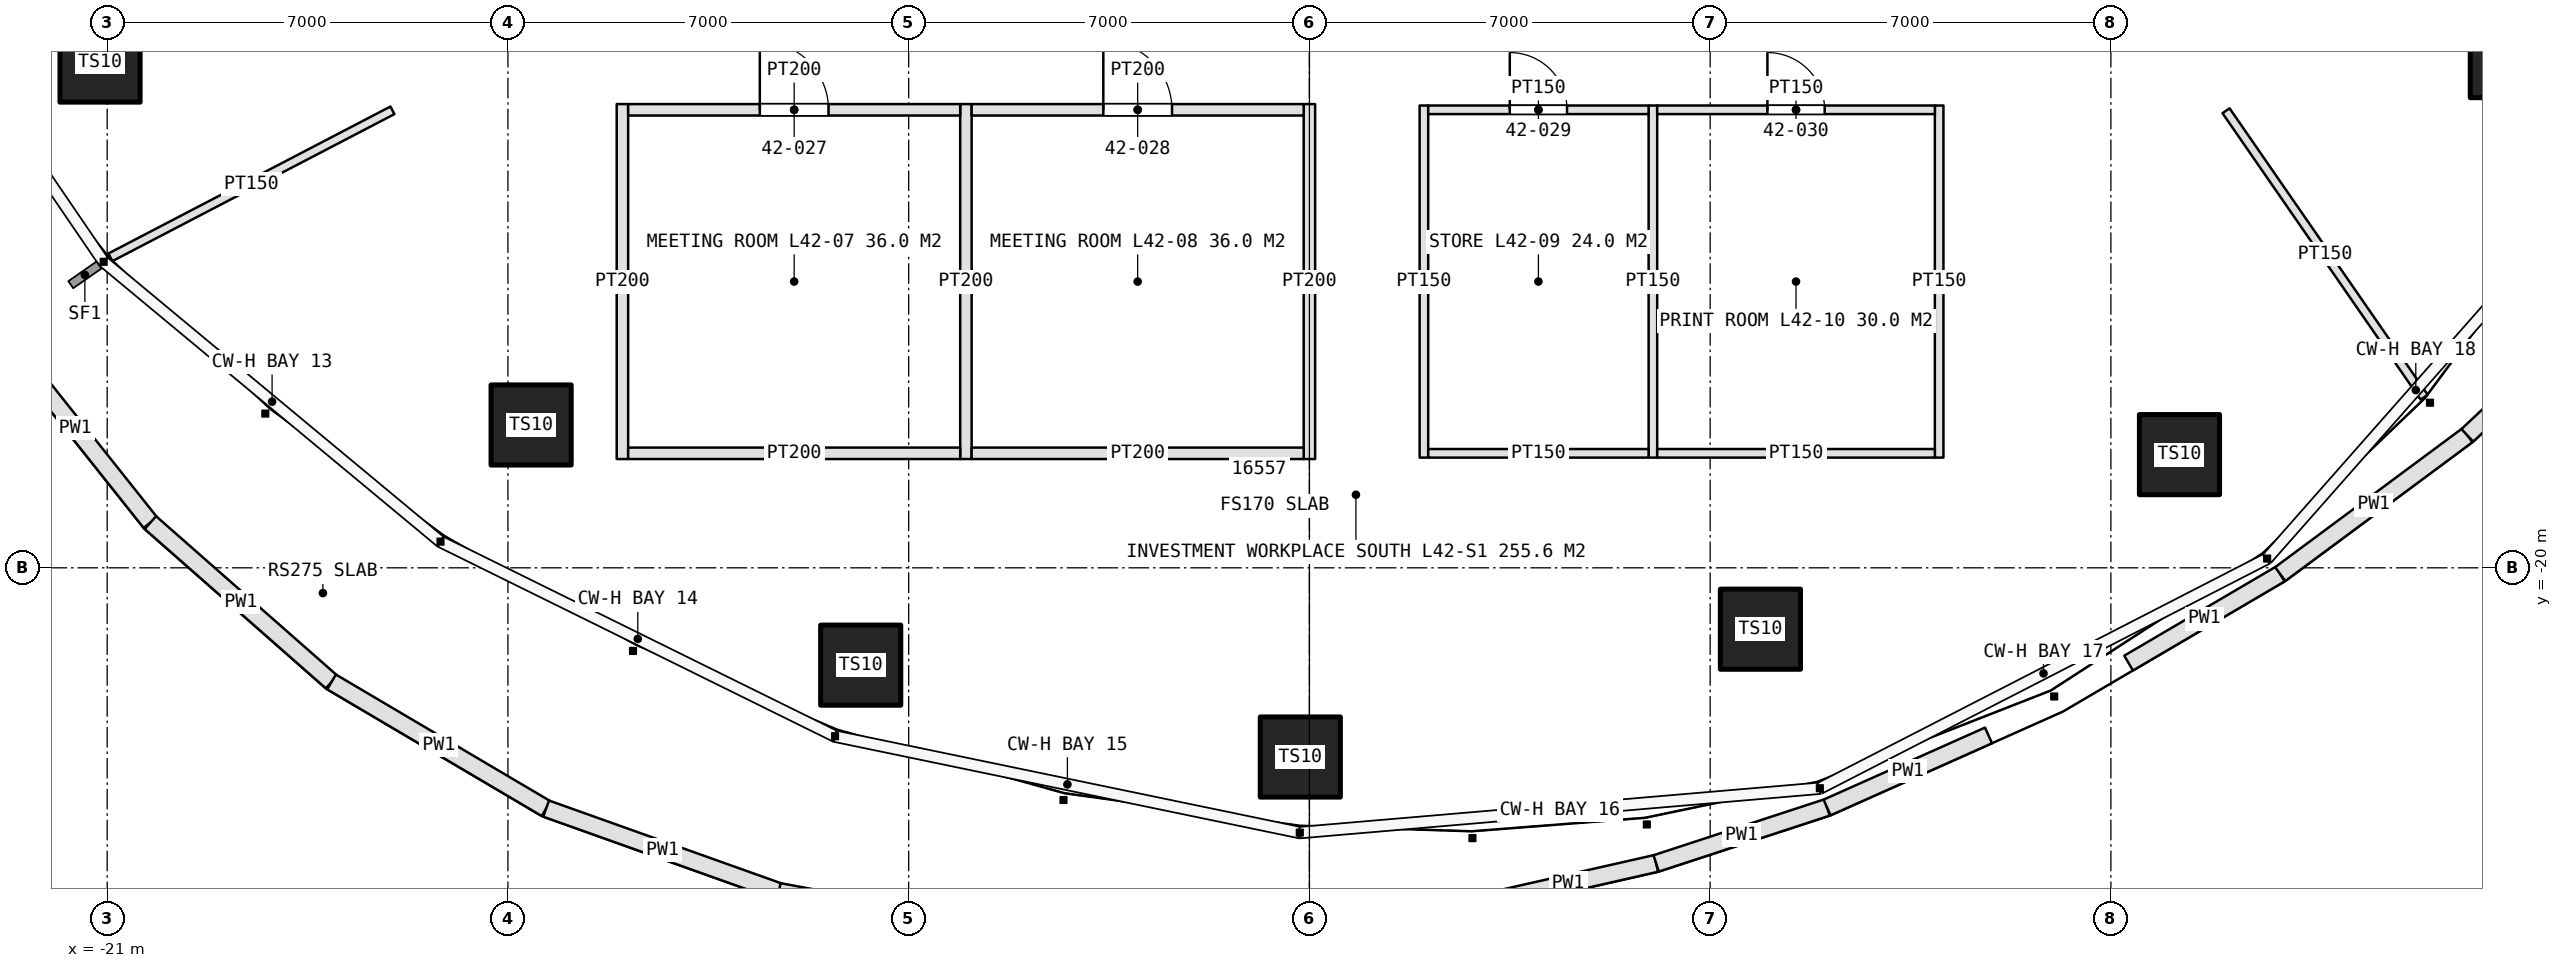
"""IFC4 building model, lengths in metres.
Left out: names, types, materials, properties, quantities, classifications, styles, units other than length and angle.
Written with IfcOpenShell. Run it as: python <this file> out.ifc"""

import sys

from ifc_helpers import new_model, si_unit, direction, frame, frame_2d, origin, origin_2d, place, context, subcontext, project, spatial, rectangle, hollow_rectangle, extrude, element, fill, save


model = new_model("IFC4")
c1 = context("Model", 3, precision=1e-05, world=origin(), true_north=direction((0.0, 1.0)))
c2 = subcontext(c1, "Body", "Model", "MODEL_VIEW")
j1 = project(units=[si_unit("LENGTHUNIT", "METRE"), si_unit("PLANEANGLEUNIT", "RADIAN")], contexts=[c1])
p1 = place(None, origin())
s1 = spatial("IfcSite", under=j1, at=p1, CompositionType="ELEMENT")
p2 = place(p1, origin())
s2 = spatial("IfcBuilding", under=s1, at=p2, CompositionType="ELEMENT")
p3 = place(p2, frame((0.0, 0.0, 194.8)))
s3 = spatial("IfcBuildingStorey", under=s2, at=p3, CompositionType="ELEMENT", Elevation=194.8)
for number, where, z_axis, x_axis in (
    (1, (-21.125, -11.166, 0.775), (0.0, 0.0, 1.0), (1.0, 0.0, 0.0)),
    (2, (-13.595, -17.505, 0.775), (0.0, 0.0, 1.0), (1.0, 0.0, 0.0)),
    (3, (-7.838, -21.7, 0.775), (0.0, 0.0, 1.0), (1.0, 0.0, 0.0)),
    (4, (-0.159, -23.305, 0.775), (0.0, 0.0, 1.0), (1.0, 0.0, 0.0)),
    (5, (7.878, -21.072, 0.775), (0.0, 0.0, 1.0), (1.0, 0.0, 0.0)),
):
    element("IfcColumn", number, at=place(p3, frame(where, z_axis=z_axis, x_axis=x_axis)), inside=s3, PredefinedType="COLUMN", context=c2, shape_type="SweptSolid", body=[
        extrude(hollow_rectangle(XDim=1.4, YDim=1.4, WallThickness=0.15, at=origin_2d()), origin(), (0.0, 0.0, 1.0), 3.425),
    ])
p4 = place(p3, frame((15.198, -18.023, 0.0), z_axis=(0.0, 0.0, 1.0), x_axis=(1.0, 0.0, 0.0)))
e6 = element("IfcColumn", 6, at=p4, inside=s3, PredefinedType="COLUMN", context=c2, shape_type="SweptSolid", body=[
    extrude(hollow_rectangle(XDim=1.4, YDim=1.4, WallThickness=0.15, at=origin_2d()), origin(), (0.0, 0.0, 1.0), 4.2),
])
p5 = place(p3, frame((20.977, -11.088, 0.775), z_axis=(0.0, 0.0, 1.0), x_axis=(1.0, 0.0, 0.0)))
e7 = element("IfcColumn", 7, at=p5, inside=s3, PredefinedType="COLUMN", context=c2, shape_type="SweptSolid", body=[
    extrude(hollow_rectangle(XDim=1.4, YDim=1.4, WallThickness=0.15, at=origin_2d()), origin(), (0.0, 0.0, 1.0), 3.425),
])
p6 = place(p3, frame((-22.868, -15.912, 0.0), z_axis=(0.0, 0.0, 1.0), x_axis=(0.622438896424, -0.782668397355, 0.0)))
e8 = element("IfcWall", 8, at=p6, inside=s3, PredefinedType="PARAPET", context=c2, shape_type="SweptSolid", body=[
    extrude(rectangle(XDim=4.215, YDim=0.3, at=frame_2d((2.107, 0.0))), origin(), (0.0, 0.0, 1.0), 1.1),
])
p7 = place(p3, frame((-20.245, -19.211, 0.0), z_axis=(0.0, 0.0, 1.0), x_axis=(0.750934151347, -0.660377089503, 0.0)))
e9 = element("IfcWall", 9, at=p7, inside=s3, PredefinedType="PARAPET", context=c2, shape_type="SweptSolid", body=[
    extrude(rectangle(XDim=4.214, YDim=0.3, at=frame_2d((2.107, 0.0))), origin(), (0.0, 0.0, 1.0), 1.1),
])
p8 = place(p3, frame((-17.081, -21.993, 0.0), z_axis=(0.0, 0.0, 1.0), x_axis=(0.861138627199, -0.508370204423, 0.0)))
e10 = element("IfcWall", 10, at=p8, inside=s3, PredefinedType="PARAPET", context=c2, shape_type="SweptSolid", body=[
    extrude(rectangle(XDim=4.353, YDim=0.3, at=frame_2d((2.176, 0.0))), origin(), (0.0, 0.0, 1.0), 1.1),
])
p9 = place(p3, frame((-13.333, -24.206, 0.0), z_axis=(0.0, 0.0, 1.0), x_axis=(0.941955383796, -0.335738074899, 0.0)))
e11 = element("IfcWall", 11, at=p9, inside=s3, PredefinedType="PARAPET", context=c2, shape_type="SweptSolid", body=[
    extrude(rectangle(XDim=4.317, YDim=0.3, at=frame_2d((2.159, 0.0))), origin(), (0.0, 0.0, 1.0), 1.1),
])
p10 = place(p3, frame((-9.266, -25.656, 0.0), z_axis=(0.0, 0.0, 1.0), x_axis=(0.983104236835, -0.183046604766, 0.0)))
e12 = element("IfcWall", 12, at=p10, inside=s3, PredefinedType="PARAPET", context=c2, shape_type="SweptSolid", body=[
    extrude(rectangle(XDim=3.086, YDim=0.3, at=frame_2d((1.543, 0.0))), origin(), (0.0, 0.0, 1.0), 1.1),
])
p11 = place(p3, frame((2.979, -25.861, 0.0), z_axis=(0.0, 0.0, 1.0), x_axis=(0.975240636429, 0.221146334038, 0.0)))
e13 = element("IfcWall", 13, at=p11, inside=s3, PredefinedType="PARAPET", context=c2, shape_type="SweptSolid", body=[
    extrude(rectangle(XDim=3.156, YDim=0.3, at=frame_2d((1.578, 0.0))), origin(), (0.0, 0.0, 1.0), 1.1),
])
p12 = place(p3, frame((6.057, -25.163, 0.0), z_axis=(0.0, 0.0, 1.0), x_axis=(0.950395039811, 0.311045444113, 0.0)))
e14 = element("IfcWall", 14, at=p12, inside=s3, PredefinedType="PARAPET", context=c2, shape_type="SweptSolid", body=[
    extrude(rectangle(XDim=3.14, YDim=0.3, at=frame_2d((1.57, 0.0))), origin(), (0.0, 0.0, 1.0), 1.1),
])
p13 = place(p3, frame((9.042, -24.186, 0.0), z_axis=(0.0, 0.0, 1.0), x_axis=(0.913214053774, 0.407480173739, 0.0)))
e15 = element("IfcWall", 15, at=p13, inside=s3, PredefinedType="PARAPET", context=c2, shape_type="SweptSolid", body=[
    extrude(rectangle(XDim=3.089, YDim=0.3, at=frame_2d((1.544, 0.0))), origin(), (0.0, 0.0, 1.0), 1.1),
])
p14 = place(p3, frame((14.309, -21.664, 0.0), z_axis=(0.0, 0.0, 1.0), x_axis=(0.862426346501, 0.506182572656, 0.0)))
e16 = element("IfcWall", 16, at=p14, inside=s3, PredefinedType="PARAPET", context=c2, shape_type="SweptSolid", body=[
    extrude(rectangle(XDim=3.071, YDim=0.3, at=frame_2d((1.535, 0.0))), origin(), (0.0, 0.0, 1.0), 1.1),
])
p15 = place(p3, frame((16.958, -20.11, 0.0), z_axis=(0.0, 0.0, 1.0), x_axis=(0.803271187039, 0.595613465322, 0.0)))
e17 = element("IfcWall", 17, at=p15, inside=s3, PredefinedType="PARAPET", context=c2, shape_type="SweptSolid", body=[
    extrude(rectangle(XDim=4.069, YDim=0.3, at=frame_2d((2.035, 0.0))), origin(), (0.0, 0.0, 1.0), 1.1),
])
p16 = place(p3, frame((20.226, -17.686, 0.0), z_axis=(0.0, 0.0, 1.0), x_axis=(0.727436462823, 0.686175045127, 0.0)))
e18 = element("IfcWall", 18, at=p16, inside=s3, PredefinedType="PARAPET", context=c2, shape_type="SweptSolid", body=[
    extrude(rectangle(XDim=4.189, YDim=0.3, at=frame_2d((2.095, 0.0))), origin(), (0.0, 0.0, 1.0), 1.1),
])
for number, where, z_axis, x_axis in (
    (19, (-12.0, -11.9, 0.0), (0.0, 0.0, 1.0), (0.0, -1.0, 0.0)),
    (20, (-6.0, -11.9, 0.0), (0.0, 0.0, 1.0), (0.0, -1.0, 0.0)),
    (21, (0.0, -11.9, 0.0), (0.0, 0.0, 1.0), (0.0, -1.0, 0.0)),
):
    element("IfcWall", number, at=place(p3, frame(where, z_axis=z_axis, x_axis=x_axis)), inside=s3, PredefinedType="PARTITIONING", context=c2, shape_type="SweptSolid", body=[
        extrude(rectangle(XDim=6.2, YDim=0.2, at=frame_2d((3.1, 0.0))), origin(), (0.0, 0.0, 1.0), 3.0),
    ])
p17 = place(p3, frame((-11.9, -12.0, 0.0), z_axis=(0.0, 0.0, 1.0), x_axis=(1.0, 0.0, 0.0)))
e22 = element("IfcWall", 22, at=p17, inside=s3, PredefinedType="PARTITIONING", context=c2, shape_type="SweptSolid", body=[
    extrude(rectangle(XDim=5.8, YDim=0.2, at=frame_2d((2.9, 0.0))), origin(), (0.0, 0.0, 1.0), 3.0),
])
p18 = place(p17, frame((2.3, 0.0, 0.0)))
e23 = element("IfcOpeningElement", 23, at=p18, cuts=e22, PredefinedType="OPENING", context=c2, shape_type="SweptSolid", body=[
    extrude(rectangle(XDim=1.2, YDim=2.4, at=frame_2d((0.6, 1.2))), frame((0.0, 0.11, 0.0), z_axis=(0.0, -1.0, 0.0), x_axis=(1.0, 0.0, 0.0)), (0.0, 0.0, 1.0), 0.22),
])
p19 = place(p3, frame((-11.9, -18.0, 0.0), z_axis=(0.0, 0.0, 1.0), x_axis=(1.0, 0.0, 0.0)))
e24 = element("IfcWall", 24, at=p19, inside=s3, PredefinedType="PARTITIONING", context=c2, shape_type="SweptSolid", body=[
    extrude(rectangle(XDim=5.8, YDim=0.2, at=frame_2d((2.9, 0.0))), origin(), (0.0, 0.0, 1.0), 3.0),
])
p20 = place(p3, frame((-5.9, -12.0, 0.0), z_axis=(0.0, 0.0, 1.0), x_axis=(1.0, 0.0, 0.0)))
e25 = element("IfcWall", 25, at=p20, inside=s3, PredefinedType="PARTITIONING", context=c2, shape_type="SweptSolid", body=[
    extrude(rectangle(XDim=5.8, YDim=0.2, at=frame_2d((2.9, 0.0))), origin(), (0.0, 0.0, 1.0), 3.0),
])
p21 = place(p20, frame((2.3, 0.0, 0.0)))
e26 = element("IfcOpeningElement", 26, at=p21, cuts=e25, PredefinedType="OPENING", context=c2, shape_type="SweptSolid", body=[
    extrude(rectangle(XDim=1.2, YDim=2.4, at=frame_2d((0.6, 1.2))), frame((0.0, 0.11, 0.0), z_axis=(0.0, -1.0, 0.0), x_axis=(1.0, 0.0, 0.0)), (0.0, 0.0, 1.0), 0.22),
])
p22 = place(p3, frame((-5.9, -18.0, 0.0), z_axis=(0.0, 0.0, 1.0), x_axis=(1.0, 0.0, 0.0)))
e27 = element("IfcWall", 27, at=p22, inside=s3, PredefinedType="PARTITIONING", context=c2, shape_type="SweptSolid", body=[
    extrude(rectangle(XDim=5.8, YDim=0.2, at=frame_2d((2.9, 0.0))), origin(), (0.0, 0.0, 1.0), 3.0),
])
for number, where, z_axis, x_axis in (
    (28, (2.0, -11.925, 0.0), (0.0, 0.0, 1.0), (0.0, -1.0, 0.0)),
    (29, (6.0, -11.925, 0.0), (0.0, 0.0, 1.0), (0.0, -1.0, 0.0)),
    (30, (11.0, -11.925, 0.0), (0.0, 0.0, 1.0), (0.0, -1.0, 0.0)),
):
    element("IfcWall", number, at=place(p3, frame(where, z_axis=z_axis, x_axis=x_axis)), inside=s3, PredefinedType="PARTITIONING", context=c2, shape_type="SweptSolid", body=[
        extrude(rectangle(XDim=6.15, YDim=0.15, at=frame_2d((3.075, 0.0))), origin(), (0.0, 0.0, 1.0), 3.0),
    ])
p23 = place(p3, frame((2.075, -12.0, 0.0), z_axis=(0.0, 0.0, 1.0), x_axis=(1.0, 0.0, 0.0)))
e31 = element("IfcWall", 31, at=p23, inside=s3, PredefinedType="PARTITIONING", context=c2, shape_type="SweptSolid", body=[
    extrude(rectangle(XDim=3.85, YDim=0.15, at=frame_2d((1.925, 0.0))), origin(), (0.0, 0.0, 1.0), 3.0),
])
p24 = place(p23, frame((1.425, 0.0, 0.0)))
e32 = element("IfcOpeningElement", 32, at=p24, cuts=e31, PredefinedType="OPENING", context=c2, shape_type="SweptSolid", body=[
    extrude(rectangle(XDim=1.0, YDim=2.2, at=frame_2d((0.5, 1.1))), frame((0.0, 0.085, 0.0), z_axis=(0.0, -1.0, 0.0), x_axis=(1.0, 0.0, 0.0)), (0.0, 0.0, 1.0), 0.17),
])
p25 = place(p3, frame((2.075, -18.0, 0.0), z_axis=(0.0, 0.0, 1.0), x_axis=(1.0, 0.0, 0.0)))
e33 = element("IfcWall", 33, at=p25, inside=s3, PredefinedType="PARTITIONING", context=c2, shape_type="SweptSolid", body=[
    extrude(rectangle(XDim=3.85, YDim=0.15, at=frame_2d((1.925, 0.0))), origin(), (0.0, 0.0, 1.0), 3.0),
])
p26 = place(p3, frame((6.075, -12.0, 0.0), z_axis=(0.0, 0.0, 1.0), x_axis=(1.0, 0.0, 0.0)))
e34 = element("IfcWall", 34, at=p26, inside=s3, PredefinedType="PARTITIONING", context=c2, shape_type="SweptSolid", body=[
    extrude(rectangle(XDim=4.85, YDim=0.15, at=frame_2d((2.425, 0.0))), origin(), (0.0, 0.0, 1.0), 3.0),
])
p27 = place(p26, frame((1.925, 0.0, 0.0)))
e35 = element("IfcOpeningElement", 35, at=p27, cuts=e34, PredefinedType="OPENING", context=c2, shape_type="SweptSolid", body=[
    extrude(rectangle(XDim=1.0, YDim=2.2, at=frame_2d((0.5, 1.1))), frame((0.0, 0.085, 0.0), z_axis=(0.0, -1.0, 0.0), x_axis=(1.0, 0.0, 0.0)), (0.0, 0.0, 1.0), 0.17),
])
p28 = place(p3, frame((6.075, -18.0, 0.0), z_axis=(0.0, 0.0, 1.0), x_axis=(1.0, 0.0, 0.0)))
e36 = element("IfcWall", 36, at=p28, inside=s3, PredefinedType="PARTITIONING", context=c2, shape_type="SweptSolid", body=[
    extrude(rectangle(XDim=4.85, YDim=0.15, at=frame_2d((2.425, 0.0))), origin(), (0.0, 0.0, 1.0), 3.0),
])
p29 = place(p3, frame((-16.018, -12.009, 0.0), z_axis=(0.0, 0.0, 1.0), x_axis=(-0.886831549241, -0.462092851351, 0.0)))
e37 = element("IfcWall", 37, at=p29, inside=s3, PredefinedType="PARTITIONING", context=c2, shape_type="SweptSolid", body=[
    extrude(rectangle(XDim=5.555, YDim=0.15, at=frame_2d((2.778, 0.0))), origin(), (0.0, 0.0, 1.0), 3.0),
])
p30 = place(p3, frame((16.011, -12.016, 0.0), z_axis=(0.0, 0.0, 1.0), x_axis=(0.568863489071, -0.822431961199, 0.0)))
e38 = element("IfcWall", 38, at=p30, inside=s3, PredefinedType="PARTITIONING", context=c2, shape_type="SweptSolid", body=[
    extrude(rectangle(XDim=6.083, YDim=0.15, at=frame_2d((3.042, 0.0))), origin(), (0.0, 0.0, 1.0), 3.0),
])
p31 = place(p18, origin())
e39 = element("IfcDoor", 39, at=p31, inside=s3, OperationType="SINGLE_SWING_LEFT", PredefinedType="DOOR", context=c2, shape_type="SweptSolid", body=[
    extrude(rectangle(XDim=1.2, YDim=2.4, at=frame_2d((0.6, 1.2))), frame((0.0, 0.025, 0.0), z_axis=(0.0, -1.0, 0.0), x_axis=(1.0, 0.0, 0.0)), (0.0, 0.0, 1.0), 0.05),
])
fill(e23, e39)
p32 = place(p21, origin())
e40 = element("IfcDoor", 40, at=p32, inside=s3, OperationType="SINGLE_SWING_LEFT", PredefinedType="DOOR", context=c2, shape_type="SweptSolid", body=[
    extrude(rectangle(XDim=1.2, YDim=2.4, at=frame_2d((0.6, 1.2))), frame((0.0, 0.025, 0.0), z_axis=(0.0, -1.0, 0.0), x_axis=(1.0, 0.0, 0.0)), (0.0, 0.0, 1.0), 0.05),
])
fill(e26, e40)
p33 = place(p24, origin())
e41 = element("IfcDoor", 41, at=p33, inside=s3, OperationType="SINGLE_SWING_LEFT", PredefinedType="DOOR", context=c2, shape_type="SweptSolid", body=[
    extrude(rectangle(XDim=1.0, YDim=2.2, at=frame_2d((0.5, 1.1))), frame((0.0, 0.025, 0.0), z_axis=(0.0, -1.0, 0.0), x_axis=(1.0, 0.0, 0.0)), (0.0, 0.0, 1.0), 0.05),
])
fill(e32, e41)
p34 = place(p27, origin())
e42 = element("IfcDoor", 42, at=p34, inside=s3, OperationType="SINGLE_SWING_LEFT", PredefinedType="DOOR", context=c2, shape_type="SweptSolid", body=[
    extrude(rectangle(XDim=1.0, YDim=2.2, at=frame_2d((0.5, 1.1))), frame((0.0, 0.025, 0.0), z_axis=(0.0, -1.0, 0.0), x_axis=(1.0, 0.0, 0.0)), (0.0, 0.0, 1.0), 0.05),
])
fill(e35, e42)
save(model, sys.argv[1])
